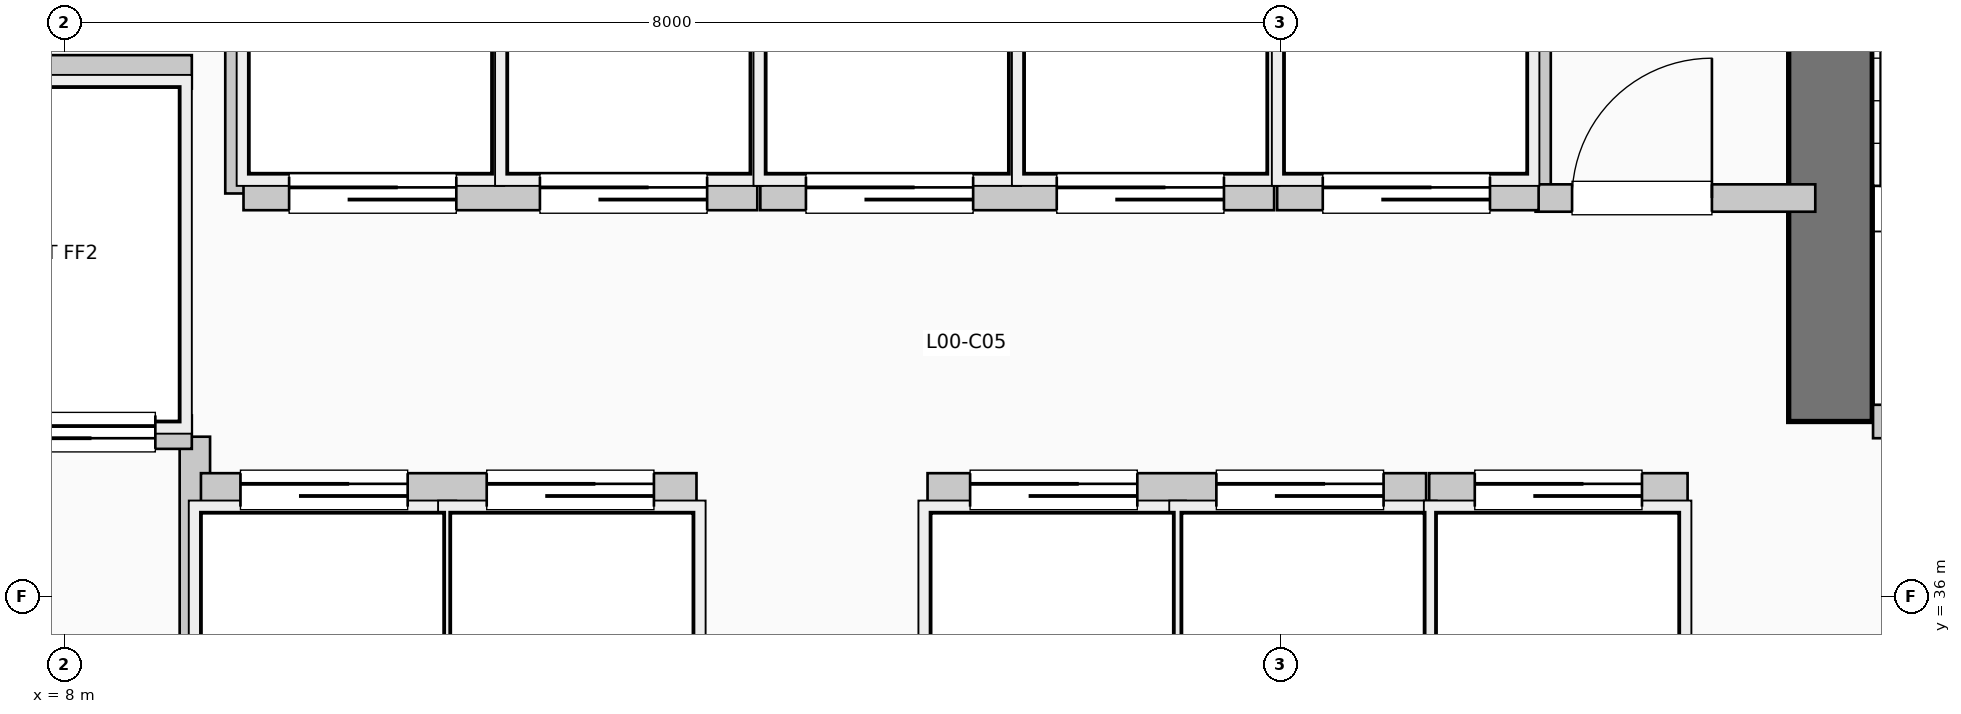
"""IFC4 building model, lengths in metres.
Left out: names, types, materials, properties, quantities, classifications, styles, units other than length and angle.
Written with IfcOpenShell. Run it as: python <this file> out.ifc"""

import sys

from ifc_helpers import new_model, si_unit, direction, frame, frame_2d, origin, place, context, subcontext, project, spatial, rectangle, extrude, element, fill, save


model = new_model("IFC4")
c1 = context("Model", 3, precision=1e-05, world=origin(), true_north=direction((0.0, 1.0)))
c2 = subcontext(c1, "Body", "Model", "MODEL_VIEW")
j1 = project(units=[si_unit("LENGTHUNIT", "METRE"), si_unit("PLANEANGLEUNIT", "RADIAN")], contexts=[c1])
p1 = place(None, origin())
s1 = spatial("IfcSite", under=j1, at=p1, CompositionType="ELEMENT")
p2 = place(p1, origin())
s2 = spatial("IfcBuilding", under=s1, at=p2, CompositionType="ELEMENT")
p3 = place(p2, origin())
s3 = spatial("IfcBuildingStorey", under=s2, at=p3, CompositionType="ELEMENT", Elevation=0.0)
p4 = place(p3, frame((19.62, 37.15, 0.0), z_axis=(0.0, 0.0, 1.0), x_axis=(0.0, 1.0, 0.0)))
e1 = element("IfcWall", 1, at=p4, inside=s3, PredefinedType="SHEAR", context=c2, shape_type="SweptSolid", body=[
    extrude(rectangle(XDim=7.89, YDim=0.55, at=frame_2d((3.945, 0.0))), origin(), (0.0, 0.0, 1.0), 5.94),
])
p5 = place(p3, frame((8.86, 34.55, 0.0), z_axis=(0.0, 0.0, 1.0), x_axis=(0.0, 1.0, 0.0)))
e2 = element("IfcWall", 2, at=p5, inside=s3, PredefinedType="PARTITIONING", context=c2, shape_type="SweptSolid", body=[
    extrude(rectangle(XDim=2.5, YDim=0.2, at=frame_2d((1.25, 0.0))), origin(), (0.0, 0.0, 1.0), 5.62),
])
p6 = place(p3, frame((19.9, 37.15, 0.0), z_axis=(0.0, 0.0, 1.0), x_axis=(1.0, 0.0, 0.0)))
e3 = element("IfcWall", 3, at=p6, inside=s3, PredefinedType="PARTITIONING", context=c2, shape_type="SweptSolid", body=[
    extrude(rectangle(XDim=3.15, YDim=0.22, at=frame_2d((1.575, 0.0))), origin(), (0.0, 0.0, 1.0), 5.62),
])
p7 = place(p6, frame((2.05, 0.0, 0.0), z_axis=(0.0, 0.0, 1.0), x_axis=(-1.0, 0.0, 0.0)))
e4 = element("IfcOpeningElement", 4, at=p7, cuts=e3, PredefinedType="OPENING", context=c2, shape_type="SweptSolid", body=[
    extrude(rectangle(XDim=1.05, YDim=2.15, at=frame_2d((0.525, 1.075))), frame((0.0, 0.12, 0.0), z_axis=(0.0, -1.0, 0.0), x_axis=(1.0, 0.0, 0.0)), (0.0, 0.0, 1.0), 0.24),
])
p8 = place(p3, frame((5.38, 37.08, 0.0), z_axis=(0.0, 0.0, 1.0), x_axis=(1.0, 0.0, 0.0)))
e5 = element("IfcWall", 5, at=p8, inside=s3, PredefinedType="PARTITIONING", context=c2, shape_type="SweptSolid", body=[
    extrude(rectangle(XDim=3.46, YDim=0.22, at=frame_2d((1.73, 0.0))), origin(), (0.0, 0.0, 1.0), 5.62),
])
p9 = place(p8, frame((1.55, 0.0, 0.0), z_axis=(0.0, 0.0, 1.0), x_axis=(-1.0, 0.0, 0.0)))
e6 = element("IfcOpeningElement", 6, at=p9, cuts=e5, PredefinedType="OPENING", context=c2, shape_type="SweptSolid", body=[
    extrude(rectangle(XDim=1.2, YDim=2.2, at=frame_2d((0.6, 1.1))), frame((0.0, 0.12, 0.0), z_axis=(0.0, -1.0, 0.0), x_axis=(1.0, 0.0, 0.0)), (0.0, 0.0, 1.0), 0.24),
])
p10 = place(p8, frame((3.22, 0.0, 0.0), z_axis=(0.0, 0.0, 1.0), x_axis=(-1.0, 0.0, 0.0)))
e7 = element("IfcOpeningElement", 7, at=p10, cuts=e5, PredefinedType="OPENING", context=c2, shape_type="SweptSolid", body=[
    extrude(rectangle(XDim=1.2, YDim=2.2, at=frame_2d((0.6, 1.1))), frame((0.0, 0.12, 0.0), z_axis=(0.0, -1.0, 0.0), x_axis=(1.0, 0.0, 0.0)), (0.0, 0.0, 1.0), 0.24),
])
p11 = place(p3, frame((5.38, 39.45, 0.0), z_axis=(0.0, 0.0, 1.0), x_axis=(1.0, 0.0, 0.0)))
e8 = element("IfcWall", 8, at=p11, inside=s3, PredefinedType="PARTITIONING", context=c2, shape_type="SweptSolid", body=[
    extrude(rectangle(XDim=3.46, YDim=0.22, at=frame_2d((1.73, 0.0))), origin(), (0.0, 0.0, 1.0), 5.62),
])
for number, where, z_axis, x_axis in (
    (9, (9.16, 38.65, 0.0), (0.0, 0.0, 1.0), (0.0, 1.0, 0.0)),
    (10, (17.68, 38.65, 0.0), (0.0, 0.0, 1.0), (0.0, 1.0, 0.0)),
):
    element("IfcWall", number, at=place(p3, frame(where, z_axis=z_axis, x_axis=x_axis)), inside=s3, PredefinedType="PARTITIONING", context=c2, shape_type="SweptSolid", body=[
        extrude(rectangle(XDim=2.35, YDim=0.2, at=frame_2d((1.175, 0.0))), origin(), (0.0, 0.0, 1.0), 5.62),
    ])
p12 = place(p3, frame((17.68, 38.62, 0.0), z_axis=(0.0, 0.0, 1.0), x_axis=(1.0, 0.0, 0.0)))
e11 = element("IfcWall", 11, at=p12, inside=s3, PredefinedType="PARTITIONING", context=c2, shape_type="SweptSolid", body=[
    extrude(rectangle(XDim=1.84, YDim=0.18, at=frame_2d((0.92, 0.0))), origin(), (0.0, 0.0, 1.0), 5.62),
])
p13 = place(p12, frame((0.24, 0.0, 0.0)))
e12 = element("IfcOpeningElement", 12, at=p13, cuts=e11, PredefinedType="OPENING", context=c2, shape_type="SweptSolid", body=[
    extrude(rectangle(XDim=0.92, YDim=2.1, at=frame_2d((0.46, 1.05))), frame((0.0, 0.1, 0.0), z_axis=(0.0, -1.0, 0.0), x_axis=(1.0, 0.0, 0.0)), (0.0, 0.0, 1.0), 0.2),
])
p14 = place(p3, frame((8.9, 36.7, 0.0), z_axis=(0.0, 0.0, 1.0), x_axis=(1.0, 0.0, 0.0)))
e13 = element("IfcWall", 13, at=p14, inside=s3, PredefinedType="PARTITIONING", context=c2, shape_type="SweptSolid", body=[
    extrude(rectangle(XDim=3.26, YDim=0.22, at=frame_2d((1.63, 0.0))), origin(), (0.0, 0.0, 1.0), 5.62),
])
p15 = place(p14, frame((0.26, 0.0, 0.0)))
e14 = element("IfcOpeningElement", 14, at=p15, cuts=e13, PredefinedType="OPENING", context=c2, shape_type="SweptSolid", body=[
    extrude(rectangle(XDim=1.1, YDim=2.2, at=frame_2d((0.55, 1.1))), frame((0.0, 0.12, 0.0), z_axis=(0.0, -1.0, 0.0), x_axis=(1.0, 0.0, 0.0)), (0.0, 0.0, 1.0), 0.24),
])
p16 = place(p14, frame((1.88, 0.0, 0.0)))
e15 = element("IfcOpeningElement", 15, at=p16, cuts=e13, PredefinedType="OPENING", context=c2, shape_type="SweptSolid", body=[
    extrude(rectangle(XDim=1.1, YDim=2.2, at=frame_2d((0.55, 1.1))), frame((0.0, 0.12, 0.0), z_axis=(0.0, -1.0, 0.0), x_axis=(1.0, 0.0, 0.0)), (0.0, 0.0, 1.0), 0.24),
])
p17 = place(p3, frame((9.18, 38.65, 0.0), z_axis=(0.0, 0.0, 1.0), x_axis=(1.0, 0.0, 0.0)))
e16 = element("IfcWall", 16, at=p17, inside=s3, PredefinedType="PARTITIONING", context=c2, shape_type="SweptSolid", body=[
    extrude(rectangle(XDim=3.38, YDim=0.22, at=frame_2d((1.69, 0.0))), origin(), (0.0, 0.0, 1.0), 5.62),
])
p18 = place(p17, frame((0.3, 0.0, 0.0)))
e17 = element("IfcOpeningElement", 17, at=p18, cuts=e16, PredefinedType="OPENING", context=c2, shape_type="SweptSolid", body=[
    extrude(rectangle(XDim=1.1, YDim=2.2, at=frame_2d((0.55, 1.1))), frame((0.0, 0.12, 0.0), z_axis=(0.0, -1.0, 0.0), x_axis=(1.0, 0.0, 0.0)), (0.0, 0.0, 1.0), 0.24),
])
p19 = place(p17, frame((1.95, 0.0, 0.0)))
e18 = element("IfcOpeningElement", 18, at=p19, cuts=e16, PredefinedType="OPENING", context=c2, shape_type="SweptSolid", body=[
    extrude(rectangle(XDim=1.1, YDim=2.2, at=frame_2d((0.55, 1.1))), frame((0.0, 0.12, 0.0), z_axis=(0.0, -1.0, 0.0), x_axis=(1.0, 0.0, 0.0)), (0.0, 0.0, 1.0), 0.24),
])
p20 = place(p3, frame((13.68, 36.7, 0.0), z_axis=(0.0, 0.0, 1.0), x_axis=(1.0, 0.0, 0.0)))
e19 = element("IfcWall", 19, at=p20, inside=s3, PredefinedType="PARTITIONING", context=c2, shape_type="SweptSolid", body=[
    extrude(rectangle(XDim=3.28, YDim=0.22, at=frame_2d((1.64, 0.0))), origin(), (0.0, 0.0, 1.0), 5.62),
])
p21 = place(p20, frame((0.28, 0.0, 0.0)))
e20 = element("IfcOpeningElement", 20, at=p21, cuts=e19, PredefinedType="OPENING", context=c2, shape_type="SweptSolid", body=[
    extrude(rectangle(XDim=1.1, YDim=2.2, at=frame_2d((0.55, 1.1))), frame((0.0, 0.12, 0.0), z_axis=(0.0, -1.0, 0.0), x_axis=(1.0, 0.0, 0.0)), (0.0, 0.0, 1.0), 0.24),
])
p22 = place(p20, frame((1.9, 0.0, 0.0)))
e21 = element("IfcOpeningElement", 21, at=p22, cuts=e19, PredefinedType="OPENING", context=c2, shape_type="SweptSolid", body=[
    extrude(rectangle(XDim=1.1, YDim=2.2, at=frame_2d((0.55, 1.1))), frame((0.0, 0.12, 0.0), z_axis=(0.0, -1.0, 0.0), x_axis=(1.0, 0.0, 0.0)), (0.0, 0.0, 1.0), 0.24),
])
p23 = place(p3, frame((12.58, 38.65, 0.0), z_axis=(0.0, 0.0, 1.0), x_axis=(1.0, 0.0, 0.0)))
e22 = element("IfcWall", 22, at=p23, inside=s3, PredefinedType="PARTITIONING", context=c2, shape_type="SweptSolid", body=[
    extrude(rectangle(XDim=3.38, YDim=0.22, at=frame_2d((1.69, 0.0))), origin(), (0.0, 0.0, 1.0), 5.62),
])
p24 = place(p23, frame((0.3, 0.0, 0.0)))
e23 = element("IfcOpeningElement", 23, at=p24, cuts=e22, PredefinedType="OPENING", context=c2, shape_type="SweptSolid", body=[
    extrude(rectangle(XDim=1.1, YDim=2.2, at=frame_2d((0.55, 1.1))), frame((0.0, 0.12, 0.0), z_axis=(0.0, -1.0, 0.0), x_axis=(1.0, 0.0, 0.0)), (0.0, 0.0, 1.0), 0.24),
])
p25 = place(p23, frame((1.95, 0.0, 0.0)))
e24 = element("IfcOpeningElement", 24, at=p25, cuts=e22, PredefinedType="OPENING", context=c2, shape_type="SweptSolid", body=[
    extrude(rectangle(XDim=1.1, YDim=2.2, at=frame_2d((0.55, 1.1))), frame((0.0, 0.12, 0.0), z_axis=(0.0, -1.0, 0.0), x_axis=(1.0, 0.0, 0.0)), (0.0, 0.0, 1.0), 0.24),
])
p26 = place(p3, frame((16.98, 36.7, 0.0), z_axis=(0.0, 0.0, 1.0), x_axis=(1.0, 0.0, 0.0)))
e25 = element("IfcWall", 25, at=p26, inside=s3, PredefinedType="PARTITIONING", context=c2, shape_type="SweptSolid", body=[
    extrude(rectangle(XDim=1.7, YDim=0.22, at=frame_2d((0.85, 0.0))), origin(), (0.0, 0.0, 1.0), 5.62),
])
p27 = place(p26, frame((0.3, 0.0, 0.0)))
e26 = element("IfcOpeningElement", 26, at=p27, cuts=e25, PredefinedType="OPENING", context=c2, shape_type="SweptSolid", body=[
    extrude(rectangle(XDim=1.1, YDim=2.2, at=frame_2d((0.55, 1.1))), frame((0.0, 0.12, 0.0), z_axis=(0.0, -1.0, 0.0), x_axis=(1.0, 0.0, 0.0)), (0.0, 0.0, 1.0), 0.24),
])
p28 = place(p3, frame((15.98, 38.65, 0.0), z_axis=(0.0, 0.0, 1.0), x_axis=(1.0, 0.0, 0.0)))
e27 = element("IfcWall", 27, at=p28, inside=s3, PredefinedType="PARTITIONING", context=c2, shape_type="SweptSolid", body=[
    extrude(rectangle(XDim=1.72, YDim=0.22, at=frame_2d((0.86, 0.0))), origin(), (0.0, 0.0, 1.0), 5.62),
])
p29 = place(p28, frame((0.3, 0.0, 0.0)))
e28 = element("IfcOpeningElement", 28, at=p29, cuts=e27, PredefinedType="OPENING", context=c2, shape_type="SweptSolid", body=[
    extrude(rectangle(XDim=1.1, YDim=2.2, at=frame_2d((0.55, 1.1))), frame((0.0, 0.12, 0.0), z_axis=(0.0, -1.0, 0.0), x_axis=(1.0, 0.0, 0.0)), (0.0, 0.0, 1.0), 0.24),
])
p30 = place(p10, origin())
e29 = element("IfcDoor", 29, at=p30, inside=s3, OperationType="SLIDING_TO_RIGHT", PredefinedType="DOOR", context=c2, shape_type="SweptSolid", body=[
    extrude(rectangle(XDim=1.2, YDim=2.2, at=frame_2d((0.6, 1.1))), frame((0.0, 0.025, 0.0), z_axis=(0.0, -1.0, 0.0), x_axis=(1.0, 0.0, 0.0)), (0.0, 0.0, 1.0), 0.05),
])
fill(e7, e29)
p31 = place(p13, origin())
e30 = element("IfcDoor", 30, at=p31, inside=s3, OperationType="SINGLE_SWING_RIGHT", PredefinedType="DOOR", context=c2, shape_type="SweptSolid", body=[
    extrude(rectangle(XDim=0.92, YDim=2.1, at=frame_2d((0.46, 1.05))), frame((0.0, 0.025, 0.0), z_axis=(0.0, -1.0, 0.0), x_axis=(1.0, 0.0, 0.0)), (0.0, 0.0, 1.0), 0.05),
])
fill(e12, e30)
p32 = place(p15, origin())
e31 = element("IfcDoor", 31, at=p32, inside=s3, OperationType="SLIDING_TO_LEFT", PredefinedType="DOOR", context=c2, shape_type="SweptSolid", body=[
    extrude(rectangle(XDim=1.1, YDim=2.2, at=frame_2d((0.55, 1.1))), frame((0.0, 0.025, 0.0), z_axis=(0.0, -1.0, 0.0), x_axis=(1.0, 0.0, 0.0)), (0.0, 0.0, 1.0), 0.05),
])
fill(e14, e31)
p33 = place(p16, origin())
e32 = element("IfcDoor", 32, at=p33, inside=s3, OperationType="SLIDING_TO_LEFT", PredefinedType="DOOR", context=c2, shape_type="SweptSolid", body=[
    extrude(rectangle(XDim=1.1, YDim=2.2, at=frame_2d((0.55, 1.1))), frame((0.0, 0.025, 0.0), z_axis=(0.0, -1.0, 0.0), x_axis=(1.0, 0.0, 0.0)), (0.0, 0.0, 1.0), 0.05),
])
fill(e15, e32)
p34 = place(p18, origin())
e33 = element("IfcDoor", 33, at=p34, inside=s3, OperationType="SLIDING_TO_LEFT", PredefinedType="DOOR", context=c2, shape_type="SweptSolid", body=[
    extrude(rectangle(XDim=1.1, YDim=2.2, at=frame_2d((0.55, 1.1))), frame((0.0, 0.025, 0.0), z_axis=(0.0, -1.0, 0.0), x_axis=(1.0, 0.0, 0.0)), (0.0, 0.0, 1.0), 0.05),
])
fill(e17, e33)
p35 = place(p19, origin())
e34 = element("IfcDoor", 34, at=p35, inside=s3, OperationType="SLIDING_TO_LEFT", PredefinedType="DOOR", context=c2, shape_type="SweptSolid", body=[
    extrude(rectangle(XDim=1.1, YDim=2.2, at=frame_2d((0.55, 1.1))), frame((0.0, 0.025, 0.0), z_axis=(0.0, -1.0, 0.0), x_axis=(1.0, 0.0, 0.0)), (0.0, 0.0, 1.0), 0.05),
])
fill(e18, e34)
p36 = place(p21, origin())
e35 = element("IfcDoor", 35, at=p36, inside=s3, OperationType="SLIDING_TO_RIGHT", PredefinedType="DOOR", context=c2, shape_type="SweptSolid", body=[
    extrude(rectangle(XDim=1.1, YDim=2.2, at=frame_2d((0.55, 1.1))), frame((0.0, 0.025, 0.0), z_axis=(0.0, -1.0, 0.0), x_axis=(1.0, 0.0, 0.0)), (0.0, 0.0, 1.0), 0.05),
])
fill(e20, e35)
p37 = place(p22, origin())
e36 = element("IfcDoor", 36, at=p37, inside=s3, OperationType="SLIDING_TO_RIGHT", PredefinedType="DOOR", context=c2, shape_type="SweptSolid", body=[
    extrude(rectangle(XDim=1.1, YDim=2.2, at=frame_2d((0.55, 1.1))), frame((0.0, 0.025, 0.0), z_axis=(0.0, -1.0, 0.0), x_axis=(1.0, 0.0, 0.0)), (0.0, 0.0, 1.0), 0.05),
])
fill(e21, e36)
p38 = place(p24, origin())
e37 = element("IfcDoor", 37, at=p38, inside=s3, OperationType="SLIDING_TO_RIGHT", PredefinedType="DOOR", context=c2, shape_type="SweptSolid", body=[
    extrude(rectangle(XDim=1.1, YDim=2.2, at=frame_2d((0.55, 1.1))), frame((0.0, 0.025, 0.0), z_axis=(0.0, -1.0, 0.0), x_axis=(1.0, 0.0, 0.0)), (0.0, 0.0, 1.0), 0.05),
])
fill(e23, e37)
p39 = place(p25, origin())
e38 = element("IfcDoor", 38, at=p39, inside=s3, OperationType="SLIDING_TO_RIGHT", PredefinedType="DOOR", context=c2, shape_type="SweptSolid", body=[
    extrude(rectangle(XDim=1.1, YDim=2.2, at=frame_2d((0.55, 1.1))), frame((0.0, 0.025, 0.0), z_axis=(0.0, -1.0, 0.0), x_axis=(1.0, 0.0, 0.0)), (0.0, 0.0, 1.0), 0.05),
])
fill(e24, e38)
p40 = place(p27, origin())
e39 = element("IfcDoor", 39, at=p40, inside=s3, OperationType="SLIDING_TO_LEFT", PredefinedType="DOOR", context=c2, shape_type="SweptSolid", body=[
    extrude(rectangle(XDim=1.1, YDim=2.2, at=frame_2d((0.55, 1.1))), frame((0.0, 0.025, 0.0), z_axis=(0.0, -1.0, 0.0), x_axis=(1.0, 0.0, 0.0)), (0.0, 0.0, 1.0), 0.05),
])
fill(e26, e39)
p41 = place(p29, origin())
e40 = element("IfcDoor", 40, at=p41, inside=s3, OperationType="SLIDING_TO_LEFT", PredefinedType="DOOR", context=c2, shape_type="SweptSolid", body=[
    extrude(rectangle(XDim=1.1, YDim=2.2, at=frame_2d((0.55, 1.1))), frame((0.0, 0.025, 0.0), z_axis=(0.0, -1.0, 0.0), x_axis=(1.0, 0.0, 0.0)), (0.0, 0.0, 1.0), 0.05),
])
fill(e28, e40)
save(model, sys.argv[1])
